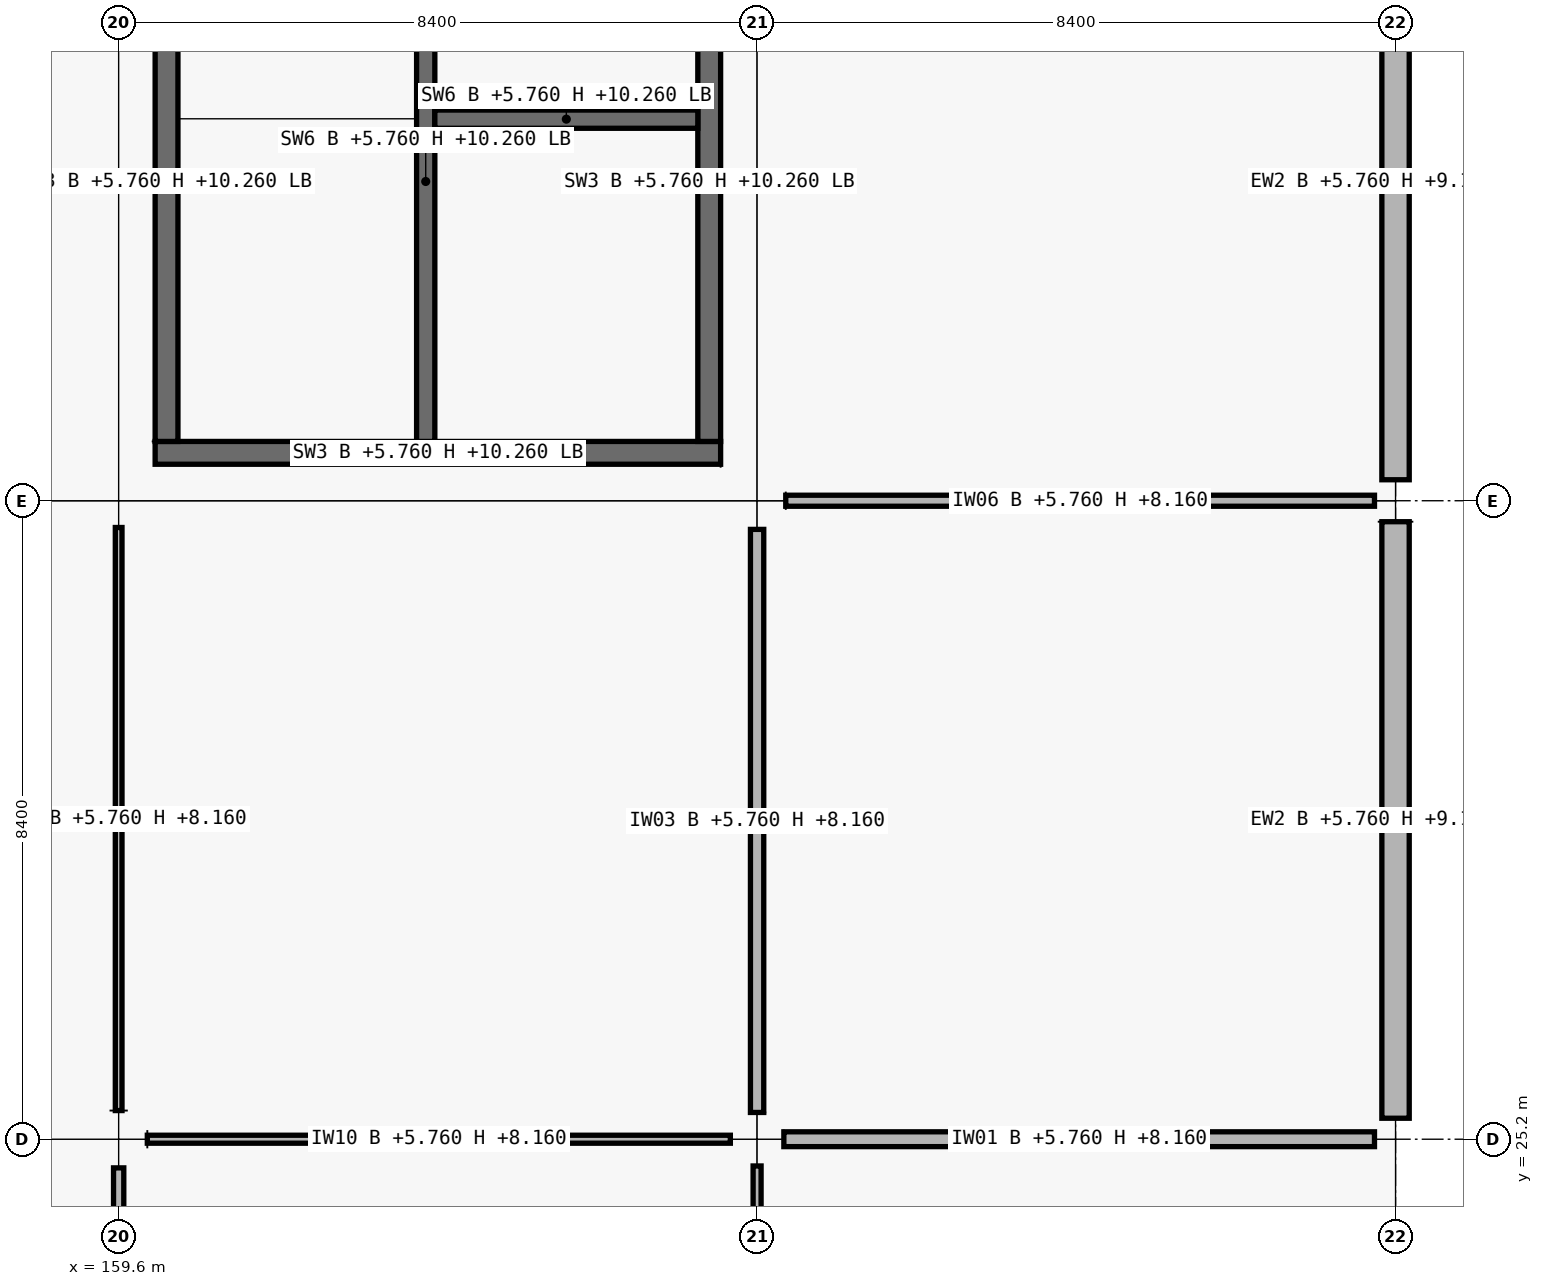
"""IFC4 building model, lengths in metres.
Left out: names, types, materials, properties, quantities, classifications, styles, units other than length and angle.
Written with IfcOpenShell. Run it as: python <this file> out.ifc"""

import sys

from ifc_helpers import new_model, si_unit, direction, frame, frame_2d, origin, origin_2d, place, context, subcontext, project, spatial, rectangle, extrude, element, fill, save


model = new_model("IFC4")
c1 = context("Model", 3, precision=1e-05, world=origin(), true_north=direction((0.0, 1.0)))
c2 = subcontext(c1, "Body", "Model", "MODEL_VIEW")
j1 = project(units=[si_unit("LENGTHUNIT", "METRE"), si_unit("PLANEANGLEUNIT", "RADIAN")], contexts=[c1])
p1 = place(None, origin())
s1 = spatial("IfcSite", under=j1, at=p1, CompositionType="ELEMENT")
p2 = place(p1, origin())
s2 = spatial("IfcBuilding", under=s1, at=p2, CompositionType="ELEMENT")
p3 = place(p2, frame((0.0, 0.0, 5.76)))
s3 = spatial("IfcBuildingStorey", under=s2, at=p3, CompositionType="ELEMENT", Elevation=5.76)
p4 = place(p3, frame((159.6, 25.2, 0.0), z_axis=(0.0, 0.0, 1.0), x_axis=(1.0, 0.0, 0.0)))
e1 = element("IfcColumn", 1, at=p4, inside=s3, PredefinedType="COLUMN", context=c2, shape_type="SweptSolid", body=[
    extrude(rectangle(XDim=0.75, YDim=0.75, at=origin_2d()), origin(), (0.0, 0.0, 1.0), 4.5),
])
for number, where, z_axis, x_axis in (
    (2, (159.6, 33.6, 0.0), (0.0, 0.0, 1.0), (1.0, 0.0, 0.0)),
    (3, (168.0, 25.2, 0.0), (0.0, 0.0, 1.0), (1.0, 0.0, 0.0)),
):
    element("IfcColumn", number, at=place(p3, frame(where, z_axis=z_axis, x_axis=x_axis)), inside=s3, PredefinedType="COLUMN", context=c2, shape_type="SweptSolid", body=[
        extrude(rectangle(XDim=0.7, YDim=0.7, at=origin_2d()), origin(), (0.0, 0.0, 1.0), 4.5),
    ])
p5 = place(p3, frame((168.0, 33.6, 0.0), z_axis=(0.0, 0.0, 1.0), x_axis=(1.0, 0.0, 0.0)))
e4 = element("IfcColumn", 4, at=p5, inside=s3, PredefinedType="COLUMN", context=c2, shape_type="SweptSolid", body=[
    extrude(rectangle(XDim=0.75, YDim=0.75, at=origin_2d()), origin(), (0.0, 0.0, 1.0), 4.5),
])
for number, where, z_axis, x_axis in (
    (5, (176.4, 25.2, 0.0), (0.0, 0.0, 1.0), (1.0, 0.0, 0.0)),
    (6, (176.4, 33.6, 0.0), (0.0, 0.0, 1.0), (1.0, 0.0, 0.0)),
):
    element("IfcColumn", number, at=place(p3, frame(where, z_axis=z_axis, x_axis=x_axis)), inside=s3, PredefinedType="COLUMN", context=c2, shape_type="SweptSolid", body=[
        extrude(rectangle(XDim=0.55, YDim=0.55, at=origin_2d()), origin(), (0.0, 0.0, 1.0), 4.2),
    ])
p6 = place(p3, frame((176.4, 33.324, 0.0), z_axis=(0.0, 0.0, 1.0), x_axis=(0.0, -1.0, 0.0)))
e7 = element("IfcWall", 7, at=p6, inside=s3, PredefinedType="SOLIDWALL", context=c2, shape_type="SweptSolid", body=[
    extrude(rectangle(XDim=7.848, YDim=0.36, at=frame_2d((3.924, 0.0))), origin(), (0.0, 0.0, 1.0), 3.4),
])
p7 = place(p6, frame((3.274, 0.0, 0.9)))
e8 = element("IfcOpeningElement", 8, at=p7, cuts=e7, PredefinedType="OPENING", context=c2, shape_type="SweptSolid", body=[
    extrude(rectangle(XDim=1.3, YDim=1.95, at=frame_2d((0.65, 0.975))), frame((0.0, 0.18, 0.0), z_axis=(0.0, -1.0, 0.0), x_axis=(1.0, 0.0, 0.0)), (0.0, 0.0, 1.0), 0.36),
])
p8 = place(p3, frame((176.4, 41.724, 0.0), z_axis=(0.0, 0.0, 1.0), x_axis=(0.0, -1.0, 0.0)))
e9 = element("IfcWall", 9, at=p8, inside=s3, PredefinedType="SOLIDWALL", context=c2, shape_type="SweptSolid", body=[
    extrude(rectangle(XDim=7.848, YDim=0.36, at=frame_2d((3.924, 0.0))), origin(), (0.0, 0.0, 1.0), 3.4),
])
p9 = place(p8, frame((2.949, 0.0, 0.9)))
e10 = element("IfcOpeningElement", 10, at=p9, cuts=e9, PredefinedType="OPENING", context=c2, shape_type="SweptSolid", body=[
    extrude(rectangle(XDim=1.95, YDim=1.6, at=frame_2d((0.975, 0.8))), frame((0.0, 0.18, 0.0), z_axis=(0.0, -1.0, 0.0), x_axis=(1.0, 0.0, 0.0)), (0.0, 0.0, 1.0), 0.36),
])
p10 = place(p3, frame((167.52, 34.23, 0.0), z_axis=(0.0, 0.0, 1.0), x_axis=(-1.0, 0.0, 0.0)))
e11 = element("IfcWall", 11, at=p10, inside=s3, PredefinedType="SHEAR", context=c2, shape_type="SweptSolid", body=[
    extrude(rectangle(XDim=7.44, YDim=0.3, at=frame_2d((3.72, 0.0))), origin(), (0.0, 0.0, 1.0), 4.5),
])
p11 = place(p10, frame((1.28, 0.0, 0.0)))
e12 = element("IfcOpeningElement", 12, at=p11, cuts=e11, PredefinedType="OPENING", context=c2, shape_type="SweptSolid", body=[
    extrude(rectangle(XDim=1.5, YDim=2.15, at=frame_2d((0.75, 1.075))), frame((0.0, 0.15, 0.0), z_axis=(0.0, -1.0, 0.0), x_axis=(1.0, 0.0, 0.0)), (0.0, 0.0, 1.0), 0.3),
])
for number, where, z_axis, x_axis in (
    (13, (160.23, 34.38, 0.0), (0.0, 0.0, 1.0), (0.0, 1.0, 0.0)),
    (14, (167.37, 41.22, 0.0), (0.0, 0.0, 1.0), (0.0, -1.0, 0.0)),
):
    element("IfcWall", number, at=place(p3, frame(where, z_axis=z_axis, x_axis=x_axis)), inside=s3, PredefinedType="SHEAR", context=c2, shape_type="SweptSolid", body=[
        extrude(rectangle(XDim=6.84, YDim=0.3, at=frame_2d((3.42, 0.0))), origin(), (0.0, 0.0, 1.0), 4.5),
    ])
p12 = place(p3, frame((163.64, 34.38, 0.0), z_axis=(0.0, 0.0, 1.0), x_axis=(0.0, 1.0, 0.0)))
e15 = element("IfcWall", 15, at=p12, inside=s3, PredefinedType="SHEAR", context=c2, shape_type="SweptSolid", body=[
    extrude(rectangle(XDim=6.84, YDim=0.24, at=frame_2d((3.42, 0.0))), origin(), (0.0, 0.0, 1.0), 4.5),
])
p13 = place(p12, frame((0.12, 0.0, 0.0)))
e16 = element("IfcOpeningElement", 16, at=p13, cuts=e15, PredefinedType="OPENING", context=c2, shape_type="SweptSolid", body=[
    extrude(rectangle(XDim=1.0, YDim=2.15, at=frame_2d((0.5, 1.075))), frame((0.0, 0.12, 0.0), z_axis=(0.0, -1.0, 0.0), x_axis=(1.0, 0.0, 0.0)), (0.0, 0.0, 1.0), 0.24),
])
p14 = place(p3, frame((163.76, 38.62, 0.0), z_axis=(0.0, 0.0, 1.0), x_axis=(1.0, 0.0, 0.0)))
e17 = element("IfcWall", 17, at=p14, inside=s3, PredefinedType="SHEAR", context=c2, shape_type="SweptSolid", body=[
    extrude(rectangle(XDim=3.46, YDim=0.24, at=frame_2d((1.73, 0.0))), origin(), (0.0, 0.0, 1.0), 4.5),
])
p15 = place(p14, frame((1.08, 0.0, 0.0)))
e18 = element("IfcOpeningElement", 18, at=p15, cuts=e17, PredefinedType="OPENING", context=c2, shape_type="SweptSolid", body=[
    extrude(rectangle(XDim=1.3, YDim=2.25, at=frame_2d((0.65, 1.125))), frame((0.0, 0.12, 0.0), z_axis=(0.0, -1.0, 0.0), x_axis=(1.0, 0.0, 0.0)), (0.0, 0.0, 1.0), 0.24),
])
p16 = place(p3, frame((159.977, 25.2, 0.0), z_axis=(0.0, 0.0, 1.0), x_axis=(1.0, 0.0, 0.0)))
e19 = element("IfcWall", 19, at=p16, inside=s3, PredefinedType="PARTITIONING", context=c2, shape_type="SweptSolid", body=[
    extrude(rectangle(XDim=7.671, YDim=0.105, at=frame_2d((3.835, 0.0))), origin(), (0.0, 0.0, 1.0), 2.4),
])
p17 = place(p16, frame((3.331, 0.0, 0.0)))
e20 = element("IfcOpeningElement", 20, at=p17, cuts=e19, PredefinedType="OPENING", context=c2, shape_type="SweptSolid", body=[
    extrude(rectangle(XDim=1.01, YDim=2.12, at=frame_2d((0.505, 1.06))), frame((0.0, 0.052, 0.0), z_axis=(0.0, -1.0, 0.0), x_axis=(1.0, 0.0, 0.0)), (0.0, 0.0, 1.0), 0.105),
])
p18 = place(p3, frame((168.352, 25.2, 0.0), z_axis=(0.0, 0.0, 1.0), x_axis=(1.0, 0.0, 0.0)))
e21 = element("IfcWall", 21, at=p18, inside=s3, PredefinedType="PARTITIONING", context=c2, shape_type="SweptSolid", body=[
    extrude(rectangle(XDim=7.771, YDim=0.195, at=frame_2d((3.885, 0.0))), origin(), (0.0, 0.0, 1.0), 2.4),
])
p19 = place(p18, frame((3.385, 0.0, 0.0)))
e22 = element("IfcOpeningElement", 22, at=p19, cuts=e21, PredefinedType="OPENING", context=c2, shape_type="SweptSolid", body=[
    extrude(rectangle(XDim=1.0, YDim=2.2, at=frame_2d((0.5, 1.1))), frame((0.0, 0.098, 0.0), z_axis=(0.0, -1.0, 0.0), x_axis=(1.0, 0.0, 0.0)), (0.0, 0.0, 1.0), 0.195),
])
p20 = place(p3, frame((168.377, 33.6, 0.0), z_axis=(0.0, 0.0, 1.0), x_axis=(1.0, 0.0, 0.0)))
e23 = element("IfcWall", 23, at=p20, inside=s3, PredefinedType="PARTITIONING", context=c2, shape_type="SweptSolid", body=[
    extrude(rectangle(XDim=7.746, YDim=0.145, at=frame_2d((3.873, 0.0))), origin(), (0.0, 0.0, 1.0), 2.4),
])
p21 = place(p20, frame((3.353, 0.0, 0.0)))
e24 = element("IfcOpeningElement", 24, at=p21, cuts=e23, PredefinedType="OPENING", context=c2, shape_type="SweptSolid", body=[
    extrude(rectangle(XDim=1.04, YDim=2.2, at=frame_2d((0.52, 1.1))), frame((0.0, 0.073, 0.0), z_axis=(0.0, -1.0, 0.0), x_axis=(1.0, 0.0, 0.0)), (0.0, 0.0, 1.0), 0.145),
])
p22 = place(p3, frame((159.6, 17.152, 0.0), z_axis=(0.0, 0.0, 1.0), x_axis=(0.0, 1.0, 0.0)))
e25 = element("IfcWall", 25, at=p22, inside=s3, PredefinedType="PARTITIONING", context=c2, shape_type="SweptSolid", body=[
    extrude(rectangle(XDim=7.671, YDim=0.135, at=frame_2d((3.835, 0.0))), origin(), (0.0, 0.0, 1.0), 2.4),
])
p23 = place(p22, frame((3.331, 0.0, 0.0)))
e26 = element("IfcOpeningElement", 26, at=p23, cuts=e25, PredefinedType="OPENING", context=c2, shape_type="SweptSolid", body=[
    extrude(rectangle(XDim=1.01, YDim=2.12, at=frame_2d((0.505, 1.06))), frame((0.0, 0.067, 0.0), z_axis=(0.0, -1.0, 0.0), x_axis=(1.0, 0.0, 0.0)), (0.0, 0.0, 1.0), 0.135),
])
p24 = place(p3, frame((159.6, 25.577, 0.0), z_axis=(0.0, 0.0, 1.0), x_axis=(0.0, 1.0, 0.0)))
e27 = element("IfcWall", 27, at=p24, inside=s3, PredefinedType="PARTITIONING", context=c2, shape_type="SweptSolid", body=[
    extrude(rectangle(XDim=7.671, YDim=0.088, at=frame_2d((3.835, 0.0))), origin(), (0.0, 0.0, 1.0), 2.4),
])
p25 = place(p24, frame((3.376, 0.0, 0.0)))
e28 = element("IfcOpeningElement", 28, at=p25, cuts=e27, PredefinedType="OPENING", context=c2, shape_type="SweptSolid", body=[
    extrude(rectangle(XDim=0.92, YDim=2.15, at=frame_2d((0.46, 1.075))), frame((0.0, 0.044, 0.0), z_axis=(0.0, -1.0, 0.0), x_axis=(1.0, 0.0, 0.0)), (0.0, 0.0, 1.0), 0.088),
])
p26 = place(p3, frame((168.0, 17.177, 0.0), z_axis=(0.0, 0.0, 1.0), x_axis=(0.0, 1.0, 0.0)))
e29 = element("IfcWall", 29, at=p26, inside=s3, PredefinedType="PARTITIONING", context=c2, shape_type="SweptSolid", body=[
    extrude(rectangle(XDim=7.671, YDim=0.105, at=frame_2d((3.835, 0.0))), origin(), (0.0, 0.0, 1.0), 2.4),
])
p27 = place(p26, frame((3.356, 0.0, 0.0)))
e30 = element("IfcOpeningElement", 30, at=p27, cuts=e29, PredefinedType="OPENING", context=c2, shape_type="SweptSolid", body=[
    extrude(rectangle(XDim=0.96, YDim=2.18, at=frame_2d((0.48, 1.09))), frame((0.0, 0.052, 0.0), z_axis=(0.0, -1.0, 0.0), x_axis=(1.0, 0.0, 0.0)), (0.0, 0.0, 1.0), 0.105),
])
p28 = place(p3, frame((168.0, 25.552, 0.0), z_axis=(0.0, 0.0, 1.0), x_axis=(0.0, 1.0, 0.0)))
e31 = element("IfcWall", 31, at=p28, inside=s3, PredefinedType="PARTITIONING", context=c2, shape_type="SweptSolid", body=[
    extrude(rectangle(XDim=7.671, YDim=0.175, at=frame_2d((3.835, 0.0))), origin(), (0.0, 0.0, 1.0), 2.4),
])
p29 = place(p28, frame((3.351, 0.0, 0.0)))
e32 = element("IfcOpeningElement", 32, at=p29, cuts=e31, PredefinedType="OPENING", context=c2, shape_type="SweptSolid", body=[
    extrude(rectangle(XDim=0.97, YDim=2.12, at=frame_2d((0.485, 1.06))), frame((0.0, 0.087, 0.0), z_axis=(0.0, -1.0, 0.0), x_axis=(1.0, 0.0, 0.0)), (0.0, 0.0, 1.0), 0.175),
])
p30 = place(p7, origin())
e33 = element("IfcWindow", 33, at=p30, inside=s3, PartitioningType="SINGLE_PANEL", PredefinedType="WINDOW", context=c2, shape_type="SweptSolid", body=[
    extrude(rectangle(XDim=1.3, YDim=1.95, at=frame_2d((0.65, 0.975))), frame((0.0, 0.03, 0.0), z_axis=(0.0, -1.0, 0.0), x_axis=(1.0, 0.0, 0.0)), (0.0, 0.0, 1.0), 0.06),
])
fill(e8, e33)
p31 = place(p9, origin())
e34 = element("IfcWindow", 34, at=p31, inside=s3, PartitioningType="SINGLE_PANEL", PredefinedType="WINDOW", context=c2, shape_type="SweptSolid", body=[
    extrude(rectangle(XDim=1.95, YDim=1.6, at=frame_2d((0.975, 0.8))), frame((0.0, 0.03, 0.0), z_axis=(0.0, -1.0, 0.0), x_axis=(1.0, 0.0, 0.0)), (0.0, 0.0, 1.0), 0.06),
])
fill(e10, e34)
p32 = place(p13, origin())
e35 = element("IfcDoor", 35, at=p32, inside=s3, OperationType="SINGLE_SWING_RIGHT", PredefinedType="DOOR", context=c2, shape_type="SweptSolid", body=[
    extrude(rectangle(XDim=1.0, YDim=2.15, at=frame_2d((0.5, 1.075))), frame((0.0, 0.025, 0.0), z_axis=(0.0, -1.0, 0.0), x_axis=(1.0, 0.0, 0.0)), (0.0, 0.0, 1.0), 0.05),
])
fill(e16, e35)
p33 = place(p11, origin())
e36 = element("IfcDoor", 36, at=p33, inside=s3, OperationType="DOUBLE_DOOR_SINGLE_SWING", PredefinedType="DOOR", context=c2, shape_type="SweptSolid", body=[
    extrude(rectangle(XDim=1.5, YDim=2.15, at=frame_2d((0.75, 1.075))), frame((0.0, 0.025, 0.0), z_axis=(0.0, -1.0, 0.0), x_axis=(1.0, 0.0, 0.0)), (0.0, 0.0, 1.0), 0.05),
])
fill(e12, e36)
p34 = place(p15, origin())
e37 = element("IfcDoor", 37, at=p34, inside=s3, OperationType="DOUBLE_DOOR_SLIDING", PredefinedType="DOOR", context=c2, shape_type="SweptSolid", body=[
    extrude(rectangle(XDim=1.3, YDim=2.25, at=frame_2d((0.65, 1.125))), frame((0.0, 0.025, 0.0), z_axis=(0.0, -1.0, 0.0), x_axis=(1.0, 0.0, 0.0)), (0.0, 0.0, 1.0), 0.05),
])
fill(e18, e37)
p35 = place(p17, origin())
e38 = element("IfcDoor", 38, at=p35, inside=s3, OperationType="SINGLE_SWING_LEFT", PredefinedType="DOOR", context=c2, shape_type="SweptSolid", body=[
    extrude(rectangle(XDim=1.01, YDim=2.12, at=frame_2d((0.505, 1.06))), frame((0.0, 0.025, 0.0), z_axis=(0.0, -1.0, 0.0), x_axis=(1.0, 0.0, 0.0)), (0.0, 0.0, 1.0), 0.05),
])
fill(e20, e38)
p36 = place(p25, origin())
e39 = element("IfcDoor", 39, at=p36, inside=s3, OperationType="SINGLE_SWING_RIGHT", PredefinedType="DOOR", context=c2, shape_type="SweptSolid", body=[
    extrude(rectangle(XDim=0.92, YDim=2.15, at=frame_2d((0.46, 1.075))), frame((0.0, 0.025, 0.0), z_axis=(0.0, -1.0, 0.0), x_axis=(1.0, 0.0, 0.0)), (0.0, 0.0, 1.0), 0.05),
])
fill(e28, e39)
p37 = place(p29, origin())
e40 = element("IfcDoor", 40, at=p37, inside=s3, OperationType="SINGLE_SWING_LEFT", PredefinedType="DOOR", context=c2, shape_type="SweptSolid", body=[
    extrude(rectangle(XDim=0.97, YDim=2.12, at=frame_2d((0.485, 1.06))), frame((0.0, 0.025, 0.0), z_axis=(0.0, -1.0, 0.0), x_axis=(1.0, 0.0, 0.0)), (0.0, 0.0, 1.0), 0.05),
])
fill(e32, e40)
p38 = place(p21, origin())
e41 = element("IfcDoor", 41, at=p38, inside=s3, OperationType="SINGLE_SWING_LEFT", PredefinedType="DOOR", context=c2, shape_type="SweptSolid", body=[
    extrude(rectangle(XDim=1.04, YDim=2.2, at=frame_2d((0.52, 1.1))), frame((0.0, 0.025, 0.0), z_axis=(0.0, -1.0, 0.0), x_axis=(1.0, 0.0, 0.0)), (0.0, 0.0, 1.0), 0.05),
])
fill(e24, e41)
p39 = place(p19, origin())
e42 = element("IfcDoor", 42, at=p39, inside=s3, OperationType="SINGLE_SWING_RIGHT", PredefinedType="DOOR", context=c2, shape_type="SweptSolid", body=[
    extrude(rectangle(XDim=1.0, YDim=2.2, at=frame_2d((0.5, 1.1))), frame((0.0, 0.025, 0.0), z_axis=(0.0, -1.0, 0.0), x_axis=(1.0, 0.0, 0.0)), (0.0, 0.0, 1.0), 0.05),
])
fill(e22, e42)
save(model, sys.argv[1])
